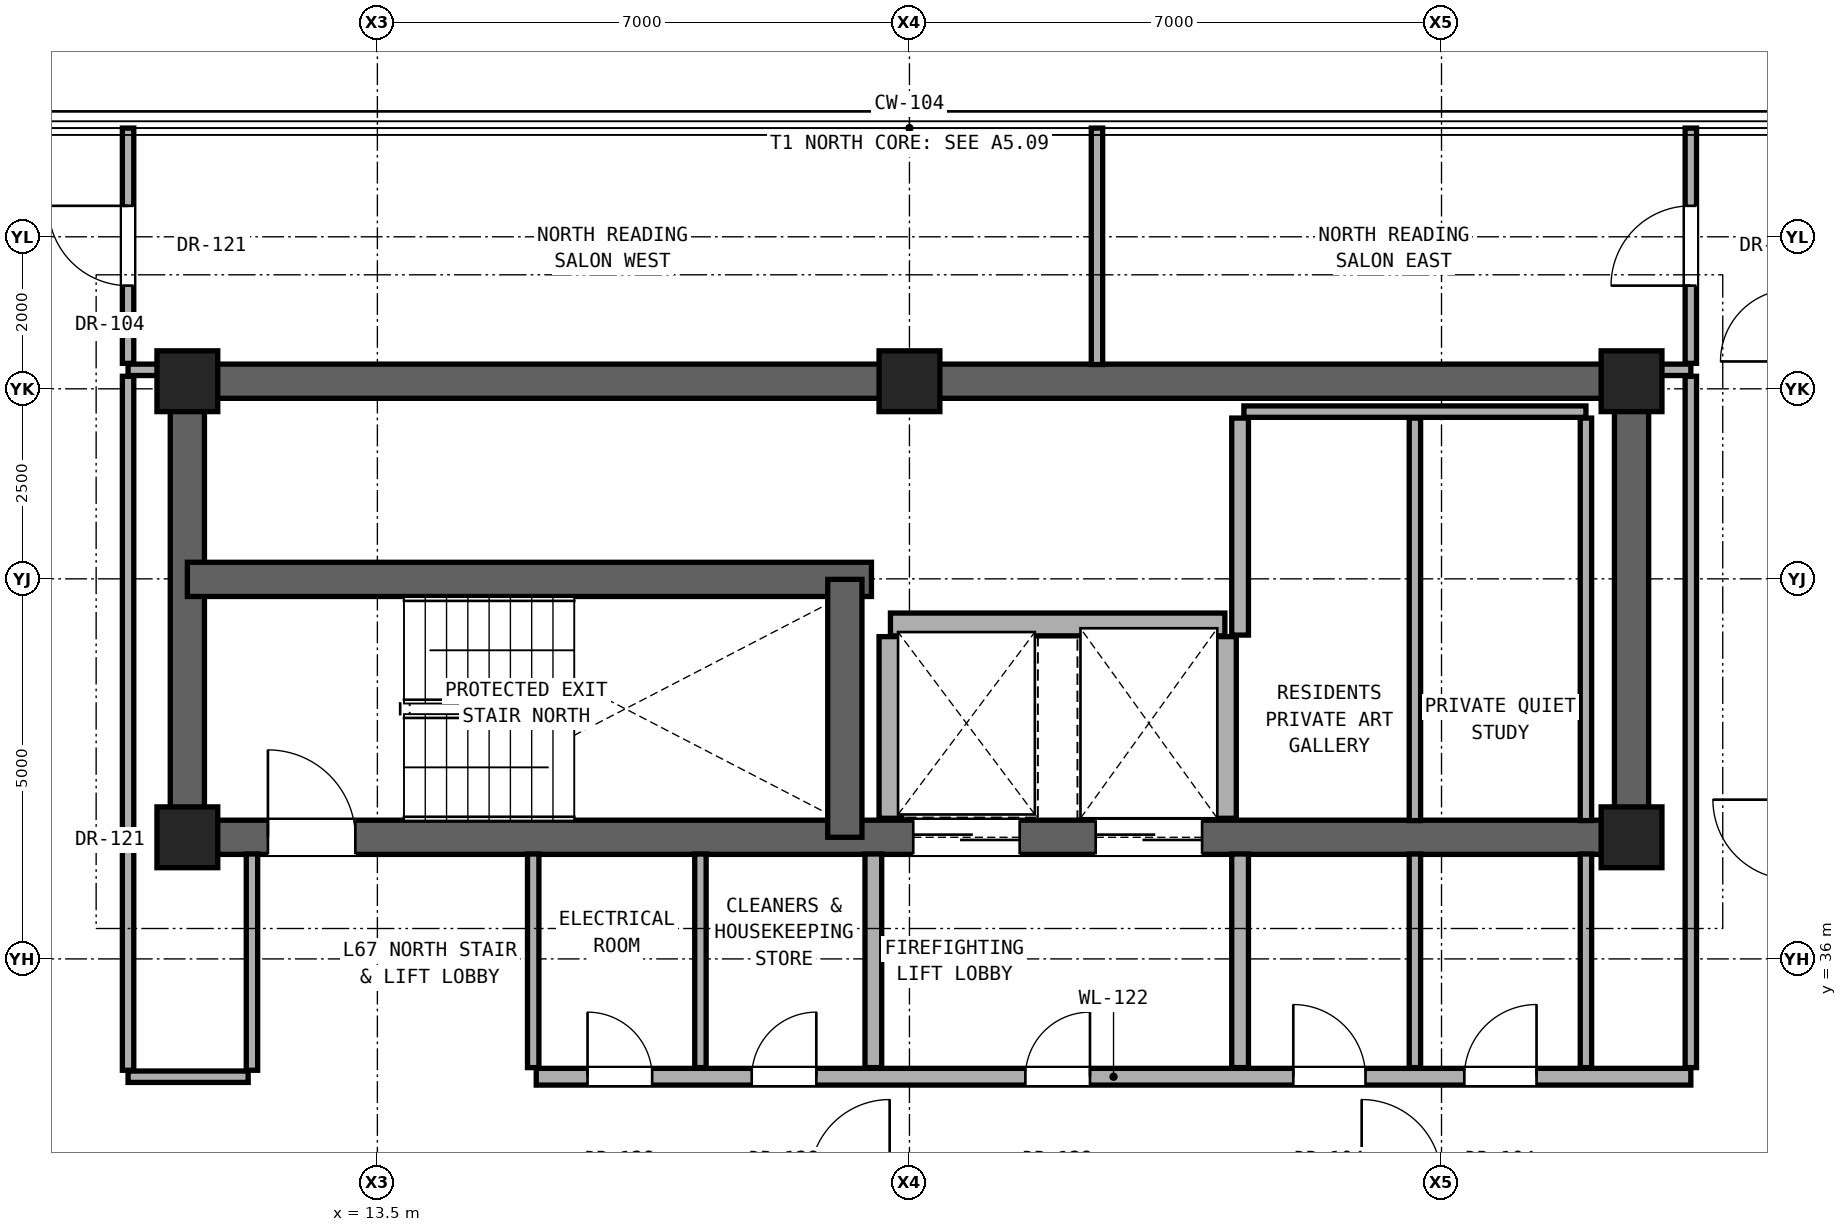
"""IFC4 building model, lengths in metres.
Left out: names, types, materials, properties, quantities, classifications, styles, units other than length and angle.
Written with IfcOpenShell. Run it as: python <this file> out.ifc"""

import sys

from ifc_helpers import new_model, si_unit, direction, frame, frame_2d, origin, origin_2d, place, context, subcontext, project, spatial, rectangle, extrude, element, fill, save


model = new_model("IFC4")
c1 = context("Model", 3, precision=1e-05, world=origin(), true_north=direction((0.0, 1.0)))
c2 = subcontext(c1, "Body", "Model", "MODEL_VIEW")
j1 = project(units=[si_unit("LENGTHUNIT", "METRE"), si_unit("PLANEANGLEUNIT", "RADIAN")], contexts=[c1])
p1 = place(None, origin())
s1 = spatial("IfcSite", under=j1, at=p1, CompositionType="ELEMENT")
p2 = place(p1, origin())
s2 = spatial("IfcBuilding", under=s1, at=p2, CompositionType="ELEMENT")
p3 = place(p2, frame((0.0, 0.0, 235.9)))
s3 = spatial("IfcBuildingStorey", under=s2, at=p3, CompositionType="ELEMENT", Elevation=235.9)
for number, where, z_axis, x_axis in (
    (1, (11.0, 37.6, 0.0), (0.0, 0.0, 1.0), (1.0, 0.0, 0.0)),
    (2, (30.0, 37.6, 0.0), (0.0, 0.0, 1.0), (1.0, 0.0, 0.0)),
    (3, (11.0, 43.6, 0.0), (0.0, 0.0, 1.0), (1.0, 0.0, 0.0)),
    (4, (20.5, 43.6, 0.0), (0.0, 0.0, 1.0), (1.0, 0.0, 0.0)),
    (5, (30.0, 43.6, 0.0), (0.0, 0.0, 1.0), (1.0, 0.0, 0.0)),
):
    element("IfcColumn", number, at=place(p3, frame(where, z_axis=z_axis, x_axis=x_axis)), inside=s3, PredefinedType="COLUMN", context=c2, shape_type="SweptSolid", body=[
        extrude(rectangle(XDim=0.8, YDim=0.8, at=origin_2d()), origin(), (0.0, 0.0, 1.0), 3.3),
    ])
p4 = place(p3, frame((11.0, 43.6, 0.0), z_axis=(0.0, 0.0, 1.0), x_axis=(1.0, 0.0, 0.0)))
e6 = element("IfcWall", 6, at=p4, inside=s3, PredefinedType="SHEAR", context=c2, shape_type="SweptSolid", body=[
    extrude(rectangle(XDim=19.0, YDim=0.45, at=frame_2d((9.5, 0.0))), origin(), (0.0, 0.0, 1.0), 3.1),
])
for number, where, z_axis, x_axis in (
    (7, (11.0, 37.6, 0.0), (0.0, 0.0, 1.0), (0.0, 1.0, 0.0)),
    (8, (30.0, 37.6, 0.0), (0.0, 0.0, 1.0), (0.0, 1.0, 0.0)),
):
    element("IfcWall", number, at=place(p3, frame(where, z_axis=z_axis, x_axis=x_axis)), inside=s3, PredefinedType="SHEAR", context=c2, shape_type="SweptSolid", body=[
        extrude(rectangle(XDim=6.0, YDim=0.45, at=frame_2d((3.0, 0.0))), origin(), (0.0, 0.0, 1.0), 3.1),
    ])
p5 = place(p3, frame((11.0, 37.6, 0.0), z_axis=(0.0, 0.0, 1.0), x_axis=(1.0, 0.0, 0.0)))
e9 = element("IfcWall", 9, at=p5, inside=s3, PredefinedType="SHEAR", context=c2, shape_type="SweptSolid", body=[
    extrude(rectangle(XDim=19.0, YDim=0.45, at=frame_2d((9.5, 0.0))), origin(), (0.0, 0.0, 1.0), 3.1),
])
p6 = place(p5, frame((1.06, 0.0, 0.0)))
e10 = element("IfcOpeningElement", 10, at=p6, cuts=e9, PredefinedType="OPENING", context=c2, shape_type="SweptSolid", body=[
    extrude(rectangle(XDim=1.15, YDim=2.2, at=frame_2d((0.575, 1.1))), frame((0.0, 0.235, 0.0), z_axis=(0.0, -1.0, 0.0), x_axis=(1.0, 0.0, 0.0)), (0.0, 0.0, 1.0), 0.47),
])
p7 = place(p5, frame((9.55, 0.0, 0.0)))
e11 = element("IfcOpeningElement", 11, at=p7, cuts=e9, PredefinedType="OPENING", context=c2, shape_type="SweptSolid", body=[
    extrude(rectangle(XDim=1.4, YDim=2.35, at=frame_2d((0.7, 1.175))), frame((0.0, 0.235, 0.0), z_axis=(0.0, -1.0, 0.0), x_axis=(1.0, 0.0, 0.0)), (0.0, 0.0, 1.0), 0.47),
])
p8 = place(p5, frame((11.95, 0.0, 0.0)))
e12 = element("IfcOpeningElement", 12, at=p8, cuts=e9, PredefinedType="OPENING", context=c2, shape_type="SweptSolid", body=[
    extrude(rectangle(XDim=1.4, YDim=2.35, at=frame_2d((0.7, 1.175))), frame((0.0, 0.235, 0.0), z_axis=(0.0, -1.0, 0.0), x_axis=(1.0, 0.0, 0.0)), (0.0, 0.0, 1.0), 0.47),
])
p9 = place(p3, frame((11.0, 40.993, 0.0), z_axis=(0.0, 0.0, 1.0), x_axis=(1.0, 0.0, 0.0)))
e13 = element("IfcWall", 13, at=p9, inside=s3, PredefinedType="SHEAR", context=c2, shape_type="SweptSolid", body=[
    extrude(rectangle(XDim=9.0, YDim=0.45, at=frame_2d((4.5, 0.0))), origin(), (0.0, 0.0, 1.0), 3.1),
])
p10 = place(p3, frame((19.65, 37.6, 0.0), z_axis=(0.0, 0.0, 1.0), x_axis=(0.0, 1.0, 0.0)))
e14 = element("IfcWall", 14, at=p10, inside=s3, PredefinedType="SHEAR", context=c2, shape_type="SweptSolid", body=[
    extrude(rectangle(XDim=3.393, YDim=0.45, at=frame_2d((1.696, 0.0))), origin(), (0.0, 0.0, 1.0), 3.1),
])
p11 = place(p3, frame((10.22, 34.45, 0.0), z_axis=(0.0, 0.0, 1.0), x_axis=(1.0, 0.0, 0.0)))
e15 = element("IfcWall", 15, at=p11, inside=s3, PredefinedType="PARTITIONING", context=c2, shape_type="SweptSolid", body=[
    extrude(rectangle(XDim=1.58, YDim=0.15, at=frame_2d((0.79, 0.0))), origin(), (0.0, 0.0, 1.0), 2.236),
])
p12 = place(p3, frame((15.59, 34.45, 0.0), z_axis=(0.0, 0.0, 1.0), x_axis=(1.0, 0.0, 0.0)))
e16 = element("IfcWall", 16, at=p12, inside=s3, PredefinedType="SOLIDWALL", context=c2, shape_type="SweptSolid", body=[
    extrude(rectangle(XDim=15.19, YDim=0.22, at=frame_2d((7.595, 0.0))), origin(), (0.0, 0.0, 1.0), 2.236),
])
p13 = place(p12, frame((6.435, 0.0, 0.0)))
e17 = element("IfcOpeningElement", 17, at=p13, cuts=e16, PredefinedType="OPENING", context=c2, shape_type="SweptSolid", body=[
    extrude(rectangle(XDim=0.85, YDim=2.01, at=frame_2d((0.425, 1.005))), frame((0.0, 0.12, 0.0), z_axis=(0.0, -1.0, 0.0), x_axis=(1.0, 0.0, 0.0)), (0.0, 0.0, 1.0), 0.24),
])
p14 = place(p12, frame((9.96, 0.0, 0.0)))
e18 = element("IfcOpeningElement", 18, at=p14, cuts=e16, PredefinedType="OPENING", context=c2, shape_type="SweptSolid", body=[
    extrude(rectangle(XDim=0.95, YDim=2.15, at=frame_2d((0.475, 1.075))), frame((0.0, 0.12, 0.0), z_axis=(0.0, -1.0, 0.0), x_axis=(1.0, 0.0, 0.0)), (0.0, 0.0, 1.0), 0.24),
])
p15 = place(p12, frame((12.21, 0.0, 0.0)))
e19 = element("IfcOpeningElement", 19, at=p15, cuts=e16, PredefinedType="OPENING", context=c2, shape_type="SweptSolid", body=[
    extrude(rectangle(XDim=0.95, YDim=2.15, at=frame_2d((0.475, 1.075))), frame((0.0, 0.12, 0.0), z_axis=(0.0, -1.0, 0.0), x_axis=(1.0, 0.0, 0.0)), (0.0, 0.0, 1.0), 0.24),
])
p16 = place(p12, frame((0.675, 0.0, 0.0)))
e20 = element("IfcOpeningElement", 20, at=p16, cuts=e16, PredefinedType="OPENING", context=c2, shape_type="SweptSolid", body=[
    extrude(rectangle(XDim=0.85, YDim=2.01, at=frame_2d((0.425, 1.005))), frame((0.0, 0.12, 0.0), z_axis=(0.0, -1.0, 0.0), x_axis=(1.0, 0.0, 0.0)), (0.0, 0.0, 1.0), 0.24),
])
p17 = place(p12, frame((2.835, 0.0, 0.0)))
e21 = element("IfcOpeningElement", 21, at=p17, cuts=e16, PredefinedType="OPENING", context=c2, shape_type="SweptSolid", body=[
    extrude(rectangle(XDim=0.85, YDim=2.01, at=frame_2d((0.425, 1.005))), frame((0.0, 0.12, 0.0), z_axis=(0.0, -1.0, 0.0), x_axis=(1.0, 0.0, 0.0)), (0.0, 0.0, 1.0), 0.24),
])
p18 = place(p3, frame((20.25, 40.4, 0.0), z_axis=(0.0, 0.0, 1.0), x_axis=(1.0, 0.0, 0.0)))
e22 = element("IfcWall", 22, at=p18, inside=s3, PredefinedType="SOLIDWALL", context=c2, shape_type="SweptSolid", body=[
    extrude(rectangle(XDim=4.4, YDim=0.3, at=frame_2d((2.2, 0.0))), origin(), (0.0, 0.0, 1.0), 3.1),
])
p19 = place(p3, frame((24.9, 43.2, 0.0), z_axis=(0.0, 0.0, 1.0), x_axis=(1.0, 0.0, 0.0)))
e23 = element("IfcWall", 23, at=p19, inside=s3, PredefinedType="PARTITIONING", context=c2, shape_type="SweptSolid", body=[
    extrude(rectangle(XDim=4.5, YDim=0.15, at=frame_2d((2.25, 0.0))), origin(), (0.0, 0.0, 1.0), 3.1),
])
for number, where, z_axis, x_axis in (
    (24, (10.22, 43.75, 0.0), (0.0, 0.0, 1.0), (1.0, 0.0, 0.0)),
    (25, (30.22, 43.75, 0.0), (0.0, 0.0, 1.0), (1.0, 0.0, 0.0)),
):
    element("IfcWall", number, at=place(p3, frame(where, z_axis=z_axis, x_axis=x_axis)), inside=s3, PredefinedType="PARTITIONING", context=c2, shape_type="SweptSolid", body=[
        extrude(rectangle(XDim=0.56, YDim=0.15, at=frame_2d((0.28, 0.0))), origin(), (0.0, 0.0, 1.0), 3.1),
    ])
p20 = place(p3, frame((10.22, 34.535, 0.0), z_axis=(0.0, 0.0, 1.0), x_axis=(0.0, 1.0, 0.0)))
e26 = element("IfcWall", 26, at=p20, inside=s3, PredefinedType="PARTITIONING", context=c2, shape_type="SweptSolid", body=[
    extrude(rectangle(XDim=9.13, YDim=0.15, at=frame_2d((4.565, 0.0))), origin(), (0.0, 0.0, 1.0), 2.492),
])
p21 = place(p3, frame((10.22, 43.835, 0.0), z_axis=(0.0, 0.0, 1.0), x_axis=(0.0, 1.0, 0.0)))
e27 = element("IfcWall", 27, at=p21, inside=s3, PredefinedType="PARTITIONING", context=c2, shape_type="SweptSolid", body=[
    extrude(rectangle(XDim=3.095, YDim=0.15, at=frame_2d((1.547, 0.0))), origin(), (0.0, 0.0, 1.0), 3.1),
])
p22 = place(p21, frame((1.022, 0.0, 0.0)))
e28 = element("IfcOpeningElement", 28, at=p22, cuts=e27, PredefinedType="OPENING", context=c2, shape_type="SweptSolid", body=[
    extrude(rectangle(XDim=1.05, YDim=2.2, at=frame_2d((0.525, 1.1))), frame((0.0, 0.085, 0.0), z_axis=(0.0, -1.0, 0.0), x_axis=(1.0, 0.0, 0.0)), (0.0, 0.0, 1.0), 0.17),
])
p23 = place(p3, frame((11.85, 34.535, 0.0), z_axis=(0.0, 0.0, 1.0), x_axis=(0.0, 1.0, 0.0)))
e29 = element("IfcWall", 29, at=p23, inside=s3, PredefinedType="PARTITIONING", context=c2, shape_type="SweptSolid", body=[
    extrude(rectangle(XDim=2.845, YDim=0.15, at=frame_2d((1.422, 0.0))), origin(), (0.0, 0.0, 1.0), 3.1),
])
for number, where, z_axis, x_axis in (
    (30, (15.55, 34.57, 0.0), (0.0, 0.0, 1.0), (0.0, 1.0, 0.0)),
    (31, (17.75, 34.57, 0.0), (0.0, 0.0, 1.0), (0.0, 1.0, 0.0)),
):
    element("IfcWall", number, at=place(p3, frame(where, z_axis=z_axis, x_axis=x_axis)), inside=s3, PredefinedType="PARTITIONING", context=c2, shape_type="SweptSolid", body=[
        extrude(rectangle(XDim=2.81, YDim=0.15, at=frame_2d((1.405, 0.0))), origin(), (0.0, 0.0, 1.0), 3.1),
    ])
p24 = place(p3, frame((20.025, 34.57, 0.0), z_axis=(0.0, 0.0, 1.0), x_axis=(0.0, 1.0, 0.0)))
e32 = element("IfcWall", 32, at=p24, inside=s3, PredefinedType="SOLIDWALL", context=c2, shape_type="SweptSolid", body=[
    extrude(rectangle(XDim=2.81, YDim=0.22, at=frame_2d((1.405, 0.0))), origin(), (0.0, 0.0, 1.0), 3.1),
])
p25 = place(p3, frame((20.25, 37.85, 0.0), z_axis=(0.0, 0.0, 1.0), x_axis=(0.0, 1.0, 0.0)))
e33 = element("IfcWall", 33, at=p25, inside=s3, PredefinedType="SOLIDWALL", context=c2, shape_type="SweptSolid", body=[
    extrude(rectangle(XDim=2.39, YDim=0.3, at=frame_2d((1.195, 0.0))), origin(), (0.0, 0.0, 1.0), 3.1),
])
p26 = place(p3, frame((22.967, 43.82, 0.0), z_axis=(0.0, 0.0, 1.0), x_axis=(0.0, 1.0, 0.0)))
e34 = element("IfcWall", 34, at=p26, inside=s3, PredefinedType="PARTITIONING", context=c2, shape_type="SweptSolid", body=[
    extrude(rectangle(XDim=3.11, YDim=0.15, at=frame_2d((1.555, 0.0))), origin(), (0.0, 0.0, 1.0), 3.1),
])
p27 = place(p3, frame((24.65, 37.85, 0.0), z_axis=(0.0, 0.0, 1.0), x_axis=(0.0, 1.0, 0.0)))
e35 = element("IfcWall", 35, at=p27, inside=s3, PredefinedType="SOLIDWALL", context=c2, shape_type="SweptSolid", body=[
    extrude(rectangle(XDim=2.39, YDim=0.3, at=frame_2d((1.195, 0.0))), origin(), (0.0, 0.0, 1.0), 3.1),
])
p28 = place(p3, frame((24.85, 34.57, 0.0), z_axis=(0.0, 0.0, 1.0), x_axis=(0.0, 1.0, 0.0)))
e36 = element("IfcWall", 36, at=p28, inside=s3, PredefinedType="SOLIDWALL", context=c2, shape_type="SweptSolid", body=[
    extrude(rectangle(XDim=2.81, YDim=0.22, at=frame_2d((1.405, 0.0))), origin(), (0.0, 0.0, 1.0), 3.1),
])
p29 = place(p3, frame((24.85, 40.26, 0.0), z_axis=(0.0, 0.0, 1.0), x_axis=(0.0, 1.0, 0.0)))
e37 = element("IfcWall", 37, at=p29, inside=s3, PredefinedType="SOLIDWALL", context=c2, shape_type="SweptSolid", body=[
    extrude(rectangle(XDim=2.855, YDim=0.22, at=frame_2d((1.427, 0.0))), origin(), (0.0, 0.0, 1.0), 3.1),
])
p30 = place(p3, frame((27.15, 34.57, 0.0), z_axis=(0.0, 0.0, 1.0), x_axis=(0.0, 1.0, 0.0)))
e38 = element("IfcWall", 38, at=p30, inside=s3, PredefinedType="PARTITIONING", context=c2, shape_type="SweptSolid", body=[
    extrude(rectangle(XDim=2.81, YDim=0.15, at=frame_2d((1.405, 0.0))), origin(), (0.0, 0.0, 1.0), 3.1),
])
p31 = place(p3, frame((27.15, 37.82, 0.0), z_axis=(0.0, 0.0, 1.0), x_axis=(0.0, 1.0, 0.0)))
e39 = element("IfcWall", 39, at=p31, inside=s3, PredefinedType="PARTITIONING", context=c2, shape_type="SweptSolid", body=[
    extrude(rectangle(XDim=5.295, YDim=0.15, at=frame_2d((2.647, 0.0))), origin(), (0.0, 0.0, 1.0), 3.1),
])
p32 = place(p3, frame((29.4, 34.57, 0.0), z_axis=(0.0, 0.0, 1.0), x_axis=(0.0, 1.0, 0.0)))
e40 = element("IfcWall", 40, at=p32, inside=s3, PredefinedType="PARTITIONING", context=c2, shape_type="SweptSolid", body=[
    extrude(rectangle(XDim=2.81, YDim=0.15, at=frame_2d((1.405, 0.0))), origin(), (0.0, 0.0, 1.0), 3.1),
])
p33 = place(p3, frame((29.4, 37.82, 0.0), z_axis=(0.0, 0.0, 1.0), x_axis=(0.0, 1.0, 0.0)))
e41 = element("IfcWall", 41, at=p33, inside=s3, PredefinedType="PARTITIONING", context=c2, shape_type="SweptSolid", body=[
    extrude(rectangle(XDim=5.295, YDim=0.15, at=frame_2d((2.647, 0.0))), origin(), (0.0, 0.0, 1.0), 3.1),
])
p34 = place(p3, frame((30.78, 34.57, 0.0), z_axis=(0.0, 0.0, 1.0), x_axis=(0.0, 1.0, 0.0)))
e42 = element("IfcWall", 42, at=p34, inside=s3, PredefinedType="PARTITIONING", context=c2, shape_type="SweptSolid", body=[
    extrude(rectangle(XDim=9.095, YDim=0.15, at=frame_2d((4.547, 0.0))), origin(), (0.0, 0.0, 1.0), 2.492),
])
p35 = place(p3, frame((30.78, 43.835, 0.0), z_axis=(0.0, 0.0, 1.0), x_axis=(0.0, 1.0, 0.0)))
e43 = element("IfcWall", 43, at=p35, inside=s3, PredefinedType="PARTITIONING", context=c2, shape_type="SweptSolid", body=[
    extrude(rectangle(XDim=3.095, YDim=0.15, at=frame_2d((1.547, 0.0))), origin(), (0.0, 0.0, 1.0), 3.1),
])
p36 = place(p35, frame((1.022, 0.0, 0.0)))
e44 = element("IfcOpeningElement", 44, at=p36, cuts=e43, PredefinedType="OPENING", context=c2, shape_type="SweptSolid", body=[
    extrude(rectangle(XDim=1.05, YDim=2.2, at=frame_2d((0.525, 1.1))), frame((0.0, 0.085, 0.0), z_axis=(0.0, -1.0, 0.0), x_axis=(1.0, 0.0, 0.0)), (0.0, 0.0, 1.0), 0.17),
])
p37 = place(p6, origin())
e45 = element("IfcDoor", 45, at=p37, inside=s3, OperationType="SINGLE_SWING_LEFT", PredefinedType="DOOR", context=c2, shape_type="SweptSolid", body=[
    extrude(rectangle(XDim=1.15, YDim=2.2, at=frame_2d((0.575, 1.1))), frame((0.0, 0.025, 0.0), z_axis=(0.0, -1.0, 0.0), x_axis=(1.0, 0.0, 0.0)), (0.0, 0.0, 1.0), 0.05),
])
fill(e10, e45)
p38 = place(p13, origin())
e46 = element("IfcDoor", 46, at=p38, inside=s3, OperationType="SINGLE_SWING_RIGHT", PredefinedType="DOOR", context=c2, shape_type="SweptSolid", body=[
    extrude(rectangle(XDim=0.85, YDim=2.01, at=frame_2d((0.425, 1.005))), frame((0.0, 0.025, 0.0), z_axis=(0.0, -1.0, 0.0), x_axis=(1.0, 0.0, 0.0)), (0.0, 0.0, 1.0), 0.05),
])
fill(e17, e46)
p39 = place(p14, origin())
e47 = element("IfcDoor", 47, at=p39, inside=s3, OperationType="SINGLE_SWING_LEFT", PredefinedType="DOOR", context=c2, shape_type="SweptSolid", body=[
    extrude(rectangle(XDim=0.95, YDim=2.15, at=frame_2d((0.475, 1.075))), frame((0.0, 0.025, 0.0), z_axis=(0.0, -1.0, 0.0), x_axis=(1.0, 0.0, 0.0)), (0.0, 0.0, 1.0), 0.05),
])
fill(e18, e47)
p40 = place(p15, origin())
e48 = element("IfcDoor", 48, at=p40, inside=s3, OperationType="SINGLE_SWING_RIGHT", PredefinedType="DOOR", context=c2, shape_type="SweptSolid", body=[
    extrude(rectangle(XDim=0.95, YDim=2.15, at=frame_2d((0.475, 1.075))), frame((0.0, 0.025, 0.0), z_axis=(0.0, -1.0, 0.0), x_axis=(1.0, 0.0, 0.0)), (0.0, 0.0, 1.0), 0.05),
])
fill(e19, e48)
p41 = place(p16, origin())
e49 = element("IfcDoor", 49, at=p41, inside=s3, OperationType="SINGLE_SWING_LEFT", PredefinedType="DOOR", context=c2, shape_type="SweptSolid", body=[
    extrude(rectangle(XDim=0.85, YDim=2.01, at=frame_2d((0.425, 1.005))), frame((0.0, 0.025, 0.0), z_axis=(0.0, -1.0, 0.0), x_axis=(1.0, 0.0, 0.0)), (0.0, 0.0, 1.0), 0.05),
])
fill(e20, e49)
p42 = place(p17, origin())
e50 = element("IfcDoor", 50, at=p42, inside=s3, OperationType="SINGLE_SWING_RIGHT", PredefinedType="DOOR", context=c2, shape_type="SweptSolid", body=[
    extrude(rectangle(XDim=0.85, YDim=2.01, at=frame_2d((0.425, 1.005))), frame((0.0, 0.025, 0.0), z_axis=(0.0, -1.0, 0.0), x_axis=(1.0, 0.0, 0.0)), (0.0, 0.0, 1.0), 0.05),
])
fill(e21, e50)
p43 = place(p22, origin())
e51 = element("IfcDoor", 51, at=p43, inside=s3, OperationType="SINGLE_SWING_RIGHT", PredefinedType="DOOR", context=c2, shape_type="SweptSolid", body=[
    extrude(rectangle(XDim=1.05, YDim=2.2, at=frame_2d((0.525, 1.1))), frame((0.0, 0.025, 0.0), z_axis=(0.0, -1.0, 0.0), x_axis=(1.0, 0.0, 0.0)), (0.0, 0.0, 1.0), 0.05),
])
fill(e28, e51)
p44 = place(p36, origin())
e52 = element("IfcDoor", 52, at=p44, inside=s3, OperationType="SINGLE_SWING_LEFT", PredefinedType="DOOR", context=c2, shape_type="SweptSolid", body=[
    extrude(rectangle(XDim=1.05, YDim=2.2, at=frame_2d((0.525, 1.1))), frame((0.0, 0.025, 0.0), z_axis=(0.0, -1.0, 0.0), x_axis=(1.0, 0.0, 0.0)), (0.0, 0.0, 1.0), 0.05),
])
fill(e44, e52)
p45 = place(p7, origin())
e53 = element("IfcDoor", 53, at=p45, inside=s3, OperationType="DOUBLE_DOOR_SLIDING", PredefinedType="DOOR", context=c2, shape_type="SweptSolid", body=[
    extrude(rectangle(XDim=1.4, YDim=2.35, at=frame_2d((0.7, 1.175))), frame((0.0, 0.025, 0.0), z_axis=(0.0, -1.0, 0.0), x_axis=(1.0, 0.0, 0.0)), (0.0, 0.0, 1.0), 0.05),
])
fill(e11, e53)
p46 = place(p8, origin())
e54 = element("IfcDoor", 54, at=p46, inside=s3, OperationType="DOUBLE_DOOR_SLIDING", PredefinedType="DOOR", context=c2, shape_type="SweptSolid", body=[
    extrude(rectangle(XDim=1.4, YDim=2.35, at=frame_2d((0.7, 1.175))), frame((0.0, 0.025, 0.0), z_axis=(0.0, -1.0, 0.0), x_axis=(1.0, 0.0, 0.0)), (0.0, 0.0, 1.0), 0.05),
])
fill(e12, e54)
save(model, sys.argv[1])
